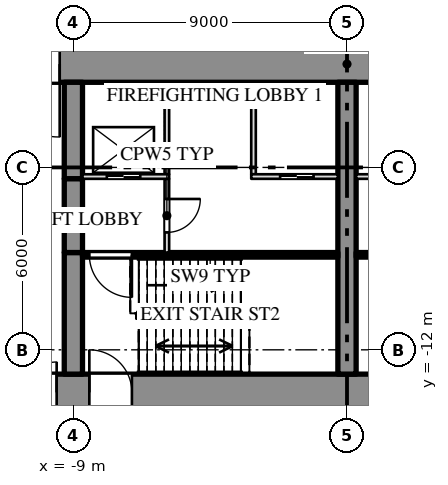
"""IFC4 building model, lengths in metres.
Left out: names, types, materials, properties, quantities, classifications, styles, units other than length and angle.
Written with IfcOpenShell. Run it as: python <this file> out.ifc"""

import sys

from ifc_helpers import new_model, si_unit, direction, frame, frame_2d, origin, place, context, subcontext, project, spatial, rectangle, extrude, element, fill, save


model = new_model("IFC4")
c1 = context("Model", 3, precision=1e-05, world=origin(), true_north=direction((0.0, 1.0)))
c2 = subcontext(c1, "Body", "Model", "MODEL_VIEW")
j1 = project(units=[si_unit("LENGTHUNIT", "METRE"), si_unit("PLANEANGLEUNIT", "RADIAN")], contexts=[c1])
p1 = place(None, origin())
s1 = spatial("IfcSite", under=j1, at=p1, CompositionType="ELEMENT")
p2 = place(p1, origin())
s2 = spatial("IfcBuilding", under=s1, at=p2, CompositionType="ELEMENT")
p3 = place(p2, origin())
s3 = spatial("IfcBuildingStorey", under=s2, at=p3, CompositionType="ELEMENT", Elevation=0.0)
p4 = place(p3, frame((-27.0, -2.6, 0.0), z_axis=(0.0, 0.0, 1.0), x_axis=(1.0, 0.0, 0.0)))
e1 = element("IfcWall", 1, at=p4, inside=s3, PredefinedType="SHEAR", context=c2, shape_type="SweptSolid", body=[
    extrude(rectangle(XDim=54.0, YDim=1.2, at=frame_2d((27.0, 0.0))), origin(), (0.0, 0.0, 1.0), 8.7),
])
p5 = place(p4, frame((15.15, 0.0, 0.0)))
e2 = element("IfcOpeningElement", 2, at=p5, cuts=e1, PredefinedType="OPENING", context=c2, shape_type="SweptSolid", body=[
    extrude(rectangle(XDim=2.4, YDim=2.1, at=frame_2d((1.2, 1.05))), frame((0.0, 0.612, 0.0), z_axis=(0.0, -1.0, 0.0), x_axis=(1.0, 0.0, 0.0)), (0.0, 0.0, 1.0), 1.224),
])
p6 = place(p4, frame((36.45, 0.0, 0.0)))
e3 = element("IfcOpeningElement", 3, at=p6, cuts=e1, PredefinedType="OPENING", context=c2, shape_type="SweptSolid", body=[
    extrude(rectangle(XDim=2.4, YDim=2.1, at=frame_2d((1.2, 1.05))), frame((0.0, 0.612, 0.0), z_axis=(0.0, -1.0, 0.0), x_axis=(1.0, 0.0, 0.0)), (0.0, 0.0, 1.0), 1.224),
])
p7 = place(p3, frame((-27.0, -13.4, 0.0), z_axis=(0.0, 0.0, 1.0), x_axis=(1.0, 0.0, 0.0)))
e4 = element("IfcWall", 4, at=p7, inside=s3, PredefinedType="SHEAR", context=c2, shape_type="SweptSolid", body=[
    extrude(rectangle(XDim=54.0, YDim=1.2, at=frame_2d((27.0, 0.0))), origin(), (0.0, 0.0, 1.0), 8.7),
])
p8 = place(p7, frame((7.075, 0.0, 0.0)))
e5 = element("IfcOpeningElement", 5, at=p8, cuts=e4, PredefinedType="OPENING", context=c2, shape_type="SweptSolid", body=[
    extrude(rectangle(XDim=1.4, YDim=2.1, at=frame_2d((0.7, 1.05))), frame((0.0, 0.612, 0.0), z_axis=(0.0, -1.0, 0.0), x_axis=(1.0, 0.0, 0.0)), (0.0, 0.0, 1.0), 1.224),
])
p9 = place(p7, frame((16.45, 0.0, 0.0)))
e6 = element("IfcOpeningElement", 6, at=p9, cuts=e4, PredefinedType="OPENING", context=c2, shape_type="SweptSolid", body=[
    extrude(rectangle(XDim=1.0, YDim=2.1, at=frame_2d((0.5, 1.05))), frame((0.0, 0.612, 0.0), z_axis=(0.0, -1.0, 0.0), x_axis=(1.0, 0.0, 0.0)), (0.0, 0.0, 1.0), 1.224),
])
p10 = place(p7, frame((18.525, 0.0, 0.0)))
e7 = element("IfcOpeningElement", 7, at=p10, cuts=e4, PredefinedType="OPENING", context=c2, shape_type="SweptSolid", body=[
    extrude(rectangle(XDim=1.4, YDim=2.1, at=frame_2d((0.7, 1.05))), frame((0.0, 0.612, 0.0), z_axis=(0.0, -1.0, 0.0), x_axis=(1.0, 0.0, 0.0)), (0.0, 0.0, 1.0), 1.224),
])
p11 = place(p7, frame((34.075, 0.0, 0.0)))
e8 = element("IfcOpeningElement", 8, at=p11, cuts=e4, PredefinedType="OPENING", context=c2, shape_type="SweptSolid", body=[
    extrude(rectangle(XDim=1.4, YDim=2.1, at=frame_2d((0.7, 1.05))), frame((0.0, 0.612, 0.0), z_axis=(0.0, -1.0, 0.0), x_axis=(1.0, 0.0, 0.0)), (0.0, 0.0, 1.0), 1.224),
])
p12 = place(p7, frame((36.55, 0.0, 0.0)))
e9 = element("IfcOpeningElement", 9, at=p12, cuts=e4, PredefinedType="OPENING", context=c2, shape_type="SweptSolid", body=[
    extrude(rectangle(XDim=1.0, YDim=2.1, at=frame_2d((0.5, 1.05))), frame((0.0, 0.612, 0.0), z_axis=(0.0, -1.0, 0.0), x_axis=(1.0, 0.0, 0.0)), (0.0, 0.0, 1.0), 1.224),
])
p13 = place(p7, frame((45.525, 0.0, 0.0)))
e10 = element("IfcOpeningElement", 10, at=p13, cuts=e4, PredefinedType="OPENING", context=c2, shape_type="SweptSolid", body=[
    extrude(rectangle(XDim=1.4, YDim=2.1, at=frame_2d((0.7, 1.05))), frame((0.0, 0.612, 0.0), z_axis=(0.0, -1.0, 0.0), x_axis=(1.0, 0.0, 0.0)), (0.0, 0.0, 1.0), 1.224),
])
p14 = place(p3, frame((-9.0, -12.8, 0.0), z_axis=(0.0, 0.0, 1.0), x_axis=(0.0, 1.0, 0.0)))
e11 = element("IfcWall", 11, at=p14, inside=s3, PredefinedType="SHEAR", context=c2, shape_type="SweptSolid", body=[
    extrude(rectangle(XDim=4.0, YDim=0.6, at=frame_2d((2.0, 0.0))), origin(), (0.0, 0.0, 1.0), 8.7),
])
p15 = place(p3, frame((-9.0, -6.375, 0.0), z_axis=(0.0, 0.0, 1.0), x_axis=(0.0, 1.0, 0.0)))
e12 = element("IfcWall", 12, at=p15, inside=s3, PredefinedType="SHEAR", context=c2, shape_type="SweptSolid", body=[
    extrude(rectangle(XDim=3.175, YDim=0.6, at=frame_2d((1.587, 0.0))), origin(), (0.0, 0.0, 1.0), 8.7),
])
p16 = place(p3, frame((-9.0, -8.8, 3.6), z_axis=(0.0, 0.0, 1.0), x_axis=(0.0, 1.0, 0.0)))
e13 = element("IfcWall", 13, at=p16, inside=s3, PredefinedType="SHEAR", context=c2, shape_type="SweptSolid", body=[
    extrude(rectangle(XDim=2.425, YDim=0.6, at=frame_2d((1.212, 0.0))), origin(), (0.0, 0.0, 1.0), 5.1),
])
p17 = place(p3, frame((0.0, -12.8, 0.0), z_axis=(0.0, 0.0, 1.0), x_axis=(0.0, 1.0, 0.0)))
e14 = element("IfcWall", 14, at=p17, inside=s3, PredefinedType="SHEAR", context=c2, shape_type="SweptSolid", body=[
    extrude(rectangle(XDim=9.6, YDim=0.6, at=frame_2d((4.8, 0.0))), origin(), (0.0, 0.0, 1.0), 8.7),
])
for number, where, z_axis, x_axis in (
    (15, (-3.075, -6.225, 0.0), (0.0, 0.0, 1.0), (0.0, 1.0, 0.0)),
    (16, (-5.925, -6.225, 0.0), (0.0, 0.0, 1.0), (0.0, 1.0, 0.0)),
):
    element("IfcWall", number, at=place(p3, frame(where, z_axis=z_axis, x_axis=x_axis)), inside=s3, PredefinedType="PARTITIONING", context=c2, shape_type="SweptSolid", body=[
        extrude(rectangle(XDim=3.025, YDim=0.15, at=frame_2d((1.513, 0.0))), origin(), (0.0, 0.0, 1.0), 8.7),
    ])
p18 = place(p3, frame((-5.925, -8.8, 0.0), z_axis=(0.0, 0.0, 1.0), x_axis=(0.0, 1.0, 0.0)))
e17 = element("IfcWall", 17, at=p18, inside=s3, PredefinedType="PARTITIONING", context=c2, shape_type="SweptSolid", body=[
    extrude(rectangle(XDim=2.425, YDim=0.15, at=frame_2d((1.212, 0.0))), origin(), (0.0, 0.0, 1.0), 8.7),
])
p19 = place(p18, frame((0.662, 0.0, 0.0)))
e18 = element("IfcOpeningElement", 18, at=p19, cuts=e17, PredefinedType="OPENING", context=c2, shape_type="SweptSolid", body=[
    extrude(rectangle(XDim=1.1, YDim=2.1, at=frame_2d((0.55, 1.05))), frame((0.0, 0.087, 0.0), z_axis=(0.0, -1.0, 0.0), x_axis=(1.0, 0.0, 0.0)), (0.0, 0.0, 1.0), 0.174),
])
p20 = place(p3, frame((-8.7, -6.3, 0.0), z_axis=(0.0, 0.0, 1.0), x_axis=(1.0, 0.0, 0.0)))
e19 = element("IfcWall", 19, at=p20, inside=s3, PredefinedType="PARTITIONING", context=c2, shape_type="SweptSolid", body=[
    extrude(rectangle(XDim=2.85, YDim=0.15, at=frame_2d((1.425, 0.0))), origin(), (0.0, 0.0, 1.0), 8.7),
])
p21 = place(p20, frame((0.8, 0.0, 0.0)))
e20 = element("IfcOpeningElement", 20, at=p21, cuts=e19, PredefinedType="OPENING", context=c2, shape_type="SweptSolid", body=[
    extrude(rectangle(XDim=1.1, YDim=2.1, at=frame_2d((0.55, 1.05))), frame((0.0, 0.087, 0.0), z_axis=(0.0, -1.0, 0.0), x_axis=(1.0, 0.0, 0.0)), (0.0, 0.0, 1.0), 0.174),
])
p22 = place(p3, frame((-3.15, -6.3, 0.0), z_axis=(0.0, 0.0, 1.0), x_axis=(1.0, 0.0, 0.0)))
e21 = element("IfcWall", 21, at=p22, inside=s3, PredefinedType="PARTITIONING", context=c2, shape_type="SweptSolid", body=[
    extrude(rectangle(XDim=2.85, YDim=0.15, at=frame_2d((1.425, 0.0))), origin(), (0.0, 0.0, 1.0), 8.7),
])
p23 = place(p22, frame((0.95, 0.0, 0.0)))
e22 = element("IfcOpeningElement", 22, at=p23, cuts=e21, PredefinedType="OPENING", context=c2, shape_type="SweptSolid", body=[
    extrude(rectangle(XDim=1.1, YDim=2.1, at=frame_2d((0.55, 1.05))), frame((0.0, 0.087, 0.0), z_axis=(0.0, -1.0, 0.0), x_axis=(1.0, 0.0, 0.0)), (0.0, 0.0, 1.0), 0.174),
])
p24 = place(p3, frame((0.3, -6.3, 0.0), z_axis=(0.0, 0.0, 1.0), x_axis=(1.0, 0.0, 0.0)))
e23 = element("IfcWall", 23, at=p24, inside=s3, PredefinedType="PARTITIONING", context=c2, shape_type="SweptSolid", body=[
    extrude(rectangle(XDim=2.85, YDim=0.15, at=frame_2d((1.425, 0.0))), origin(), (0.0, 0.0, 1.0), 8.7),
])
p25 = place(p24, frame((0.8, 0.0, 0.0)))
e24 = element("IfcOpeningElement", 24, at=p25, cuts=e23, PredefinedType="OPENING", context=c2, shape_type="SweptSolid", body=[
    extrude(rectangle(XDim=1.1, YDim=2.1, at=frame_2d((0.55, 1.05))), frame((0.0, 0.087, 0.0), z_axis=(0.0, -1.0, 0.0), x_axis=(1.0, 0.0, 0.0)), (0.0, 0.0, 1.0), 0.174),
])
p26 = place(p3, frame((-8.7, -8.875, 0.0), z_axis=(0.0, 0.0, 1.0), x_axis=(1.0, 0.0, 0.0)))
e25 = element("IfcWall", 25, at=p26, inside=s3, PredefinedType="SHEAR", context=c2, shape_type="SweptSolid", body=[
    extrude(rectangle(XDim=8.4, YDim=0.15, at=frame_2d((4.2, 0.0))), origin(), (0.0, 0.0, 1.0), 8.7),
])
p27 = place(p26, frame((0.225, 0.0, 0.0)))
e26 = element("IfcOpeningElement", 26, at=p27, cuts=e25, PredefinedType="OPENING", context=c2, shape_type="SweptSolid", body=[
    extrude(rectangle(XDim=1.4, YDim=2.1, at=frame_2d((0.7, 1.05))), frame((0.0, 0.087, 0.0), z_axis=(0.0, -1.0, 0.0), x_axis=(1.0, 0.0, 0.0)), (0.0, 0.0, 1.0), 0.174),
])
p28 = place(p3, frame((0.3, -8.875, 0.0), z_axis=(0.0, 0.0, 1.0), x_axis=(1.0, 0.0, 0.0)))
e27 = element("IfcWall", 27, at=p28, inside=s3, PredefinedType="SHEAR", context=c2, shape_type="SweptSolid", body=[
    extrude(rectangle(XDim=8.4, YDim=0.15, at=frame_2d((4.2, 0.0))), origin(), (0.0, 0.0, 1.0), 8.7),
])
p29 = place(p28, frame((6.775, 0.0, 0.0)))
e28 = element("IfcOpeningElement", 28, at=p29, cuts=e27, PredefinedType="OPENING", context=c2, shape_type="SweptSolid", body=[
    extrude(rectangle(XDim=1.4, YDim=2.1, at=frame_2d((0.7, 1.05))), frame((0.0, 0.087, 0.0), z_axis=(0.0, -1.0, 0.0), x_axis=(1.0, 0.0, 0.0)), (0.0, 0.0, 1.0), 0.174),
])
p30 = place(p5, origin())
e29 = element("IfcDoor", 29, at=p30, inside=s3, OperationType="DOUBLE_DOOR_SINGLE_SWING", PredefinedType="DOOR", context=c2, shape_type="SweptSolid", body=[
    extrude(rectangle(XDim=2.4, YDim=2.1, at=frame_2d((1.2, 1.05))), frame((0.0, 0.025, 0.0), z_axis=(0.0, -1.0, 0.0), x_axis=(1.0, 0.0, 0.0)), (0.0, 0.0, 1.0), 0.05),
])
fill(e2, e29)
p31 = place(p9, origin())
e30 = element("IfcDoor", 30, at=p31, inside=s3, OperationType="SINGLE_SWING_RIGHT", PredefinedType="DOOR", context=c2, shape_type="SweptSolid", body=[
    extrude(rectangle(XDim=1.0, YDim=2.1, at=frame_2d((0.5, 1.05))), frame((0.0, 0.025, 0.0), z_axis=(0.0, -1.0, 0.0), x_axis=(1.0, 0.0, 0.0)), (0.0, 0.0, 1.0), 0.05),
])
fill(e6, e30)
p32 = place(p10, origin())
e31 = element("IfcDoor", 31, at=p32, inside=s3, OperationType="DOUBLE_DOOR_SINGLE_SWING", PredefinedType="DOOR", context=c2, shape_type="SweptSolid", body=[
    extrude(rectangle(XDim=1.4, YDim=2.1, at=frame_2d((0.7, 1.05))), frame((0.0, 0.025, 0.0), z_axis=(0.0, -1.0, 0.0), x_axis=(1.0, 0.0, 0.0)), (0.0, 0.0, 1.0), 0.05),
])
fill(e7, e31)
p33 = place(p27, origin())
e32 = element("IfcDoor", 32, at=p33, inside=s3, OperationType="DOUBLE_DOOR_SINGLE_SWING", PredefinedType="DOOR", context=c2, shape_type="SweptSolid", body=[
    extrude(rectangle(XDim=1.4, YDim=2.1, at=frame_2d((0.7, 1.05))), frame((0.0, 0.025, 0.0), z_axis=(0.0, -1.0, 0.0), x_axis=(1.0, 0.0, 0.0)), (0.0, 0.0, 1.0), 0.05),
])
fill(e26, e32)
p34 = place(p21, origin())
e33 = element("IfcDoor", 33, at=p34, inside=s3, OperationType="SLIDING_TO_RIGHT", PredefinedType="DOOR", context=c2, shape_type="SweptSolid", body=[
    extrude(rectangle(XDim=1.1, YDim=2.1, at=frame_2d((0.55, 1.05))), frame((0.0, 0.025, 0.0), z_axis=(0.0, -1.0, 0.0), x_axis=(1.0, 0.0, 0.0)), (0.0, 0.0, 1.0), 0.05),
])
fill(e20, e33)
p35 = place(p19, origin())
e34 = element("IfcDoor", 34, at=p35, inside=s3, OperationType="SINGLE_SWING_LEFT", PredefinedType="DOOR", context=c2, shape_type="SweptSolid", body=[
    extrude(rectangle(XDim=1.1, YDim=2.1, at=frame_2d((0.55, 1.05))), frame((0.0, 0.025, 0.0), z_axis=(0.0, -1.0, 0.0), x_axis=(1.0, 0.0, 0.0)), (0.0, 0.0, 1.0), 0.05),
])
fill(e18, e34)
p36 = place(p23, origin())
e35 = element("IfcDoor", 35, at=p36, inside=s3, OperationType="SLIDING_TO_RIGHT", PredefinedType="DOOR", context=c2, shape_type="SweptSolid", body=[
    extrude(rectangle(XDim=1.1, YDim=2.1, at=frame_2d((0.55, 1.05))), frame((0.0, 0.025, 0.0), z_axis=(0.0, -1.0, 0.0), x_axis=(1.0, 0.0, 0.0)), (0.0, 0.0, 1.0), 0.05),
])
fill(e22, e35)
save(model, sys.argv[1])
